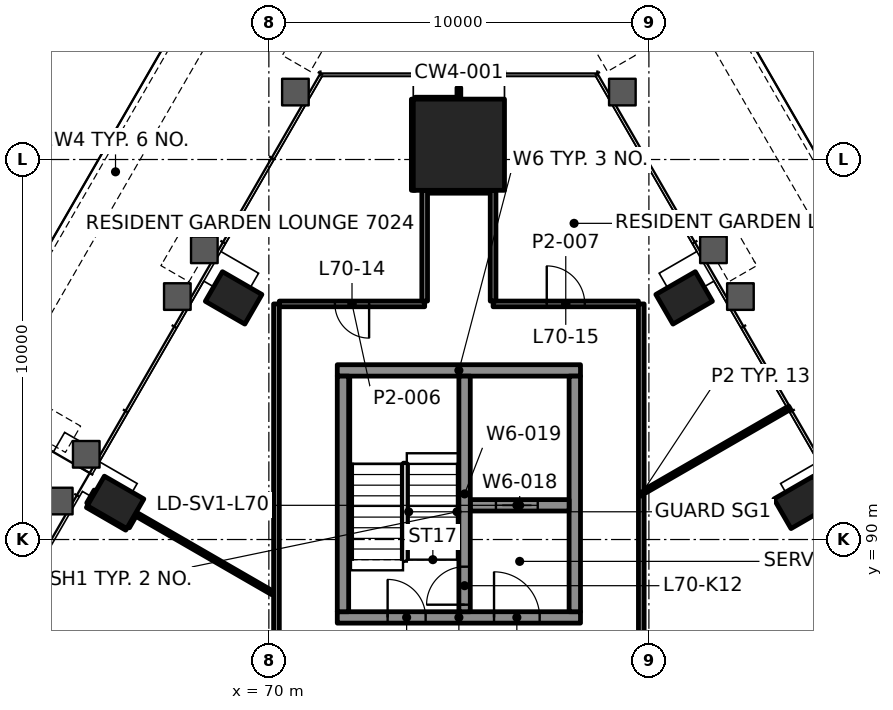
"""IFC4 building model, lengths in metres.
Left out: names, types, materials, properties, quantities, classifications, styles, units other than length and angle.
Written with IfcOpenShell. Run it as: python <this file> out.ifc"""

import sys

from ifc_helpers import new_model, si_unit, direction, frame, frame_2d, origin, origin_2d, place, context, subcontext, project, spatial, rectangle, hollow_rectangle, extrude, element, fill, save


model = new_model("IFC4")
c1 = context("Model", 3, precision=1e-05, world=origin(), true_north=direction((0.0, 1.0)))
c2 = subcontext(c1, "Body", "Model", "MODEL_VIEW")
j1 = project(units=[si_unit("LENGTHUNIT", "METRE"), si_unit("PLANEANGLEUNIT", "RADIAN")], contexts=[c1])
p1 = place(None, origin())
s1 = spatial("IfcSite", under=j1, at=p1, CompositionType="ELEMENT")
p2 = place(p1, origin())
s2 = spatial("IfcBuilding", under=s1, at=p2, CompositionType="ELEMENT")
p3 = place(p2, frame((0.0, 0.0, 291.6)))
s3 = spatial("IfcBuildingStorey", under=s2, at=p3, CompositionType="ELEMENT", Elevation=291.6)
p4 = place(p3, frame((75.0, 100.389, 0.0), z_axis=(0.0, 0.0, 1.0), x_axis=(-1.0, 0.0, 0.0)))
e1 = element("IfcColumn", 1, at=p4, inside=s3, PredefinedType="COLUMN", context=c2, shape_type="SweptSolid", body=[
    extrude(rectangle(XDim=2.4, YDim=2.4, at=origin_2d()), origin(), (0.0, 0.0, 1.0), 3.5),
])
for number, where, z_axis, x_axis in (
    (2, (84.034, 90.978, -0.0), (0.0, 0.0, 1.0), (-0.5, 0.866, 0.0)),
    (3, (80.927, 96.358, -0.0), (0.0, 0.0, 1.0), (-0.5, 0.866, 0.0)),
    (4, (69.073, 96.358, -0.0), (0.0, 0.0, 1.0), (-0.5, -0.866, 0.0)),
    (5, (65.966, 90.978, -0.0), (0.0, 0.0, 1.0), (-0.5, -0.866, 0.0)),
):
    element("IfcColumn", number, at=place(p3, frame(where, z_axis=z_axis, x_axis=x_axis)), inside=s3, PredefinedType="COLUMN", context=c2, shape_type="SweptSolid", body=[
        extrude(hollow_rectangle(XDim=0.9, YDim=1.2, WallThickness=0.06, at=origin_2d()), origin(), (0.0, 0.0, 1.0), 3.5),
    ])
p5 = place(p3, frame((71.8, 87.95, 0.0), z_axis=(0.0, 0.0, 1.0), x_axis=(1.0, 0.0, 0.0)))
e6 = element("IfcWall", 6, at=p5, inside=s3, PredefinedType="SHEAR", context=c2, shape_type="SweptSolid", body=[
    extrude(rectangle(XDim=6.4, YDim=0.3, at=frame_2d((3.2, 0.0))), origin(), (0.0, 0.0, 1.0), 3.3),
])
p6 = place(p5, frame((1.325, 0.0, 0.0)))
e7 = element("IfcOpeningElement", 7, at=p6, cuts=e6, PredefinedType="OPENING", context=c2, shape_type="SweptSolid", body=[
    extrude(rectangle(XDim=1.0, YDim=2.1, at=frame_2d((0.5, 1.05))), frame((0.0, 0.16, 0.0), z_axis=(0.0, -1.0, 0.0), x_axis=(1.0, 0.0, 0.0)), (0.0, 0.0, 1.0), 0.32),
])
p7 = place(p5, frame((4.125, 0.0, 0.0)))
e8 = element("IfcOpeningElement", 8, at=p7, cuts=e6, PredefinedType="OPENING", context=c2, shape_type="SweptSolid", body=[
    extrude(rectangle(XDim=1.2, YDim=2.1, at=frame_2d((0.6, 1.05))), frame((0.0, 0.16, 0.0), z_axis=(0.0, -1.0, 0.0), x_axis=(1.0, 0.0, 0.0)), (0.0, 0.0, 1.0), 0.32),
])
p8 = place(p3, frame((71.8, 94.45, 0.0), z_axis=(0.0, 0.0, 1.0), x_axis=(1.0, 0.0, 0.0)))
e9 = element("IfcWall", 9, at=p8, inside=s3, PredefinedType="SHEAR", context=c2, shape_type="SweptSolid", body=[
    extrude(rectangle(XDim=6.4, YDim=0.3, at=frame_2d((3.2, 0.0))), origin(), (0.0, 0.0, 1.0), 3.3),
])
for number, where, z_axis, x_axis in (
    (10, (71.95, 88.1, 0.0), (0.0, 0.0, 1.0), (0.0, 1.0, 0.0)),
    (11, (78.05, 88.1, 0.0), (0.0, 0.0, 1.0), (0.0, 1.0, 0.0)),
):
    element("IfcWall", number, at=place(p3, frame(where, z_axis=z_axis, x_axis=x_axis)), inside=s3, PredefinedType="SHEAR", context=c2, shape_type="SweptSolid", body=[
        extrude(rectangle(XDim=6.2, YDim=0.3, at=frame_2d((3.1, 0.0))), origin(), (0.0, 0.0, 1.0), 3.3),
    ])
p9 = place(p3, frame((75.3, 90.9, 0.0), z_axis=(0.0, 0.0, 1.0), x_axis=(1.0, 0.0, 0.0)))
e12 = element("IfcWall", 12, at=p9, inside=s3, PredefinedType="SHEAR", context=c2, shape_type="SweptSolid", body=[
    extrude(rectangle(XDim=2.6, YDim=0.3, at=frame_2d((1.3, 0.0))), origin(), (0.0, 0.0, 1.0), 3.3),
])
p10 = place(p9, frame((0.675, 0.0, 0.0)))
e13 = element("IfcOpeningElement", 13, at=p10, cuts=e12, PredefinedType="OPENING", context=c2, shape_type="SweptSolid", body=[
    extrude(rectangle(XDim=1.1, YDim=2.1, at=frame_2d((0.55, 1.05))), frame((0.0, 0.16, 0.0), z_axis=(0.0, -1.0, 0.0), x_axis=(1.0, 0.0, 0.0)), (0.0, 0.0, 1.0), 0.32),
])
p11 = place(p3, frame((75.15, 88.1, 0.0), z_axis=(0.0, 0.0, 1.0), x_axis=(0.0, 1.0, 0.0)))
e14 = element("IfcWall", 14, at=p11, inside=s3, PredefinedType="SHEAR", context=c2, shape_type="SweptSolid", body=[
    extrude(rectangle(XDim=6.2, YDim=0.3, at=frame_2d((3.1, 0.0))), origin(), (0.0, 0.0, 1.0), 3.3),
])
p12 = place(p11, frame((0.185, 0.0, 0.0)))
e15 = element("IfcOpeningElement", 15, at=p12, cuts=e14, PredefinedType="OPENING", context=c2, shape_type="SweptSolid", body=[
    extrude(rectangle(XDim=1.0, YDim=2.1, at=frame_2d((0.5, 1.05))), frame((0.0, 0.16, 0.0), z_axis=(0.0, -1.0, 0.0), x_axis=(1.0, 0.0, 0.0)), (0.0, 0.0, 1.0), 0.32),
])
p13 = place(p3, frame((74.1, 96.2, 0.0), z_axis=(0.0, 0.0, 1.0), x_axis=(-1.0, 0.0, 0.0)))
e16 = element("IfcWall", 16, at=p13, inside=s3, PredefinedType="PARTITIONING", context=c2, shape_type="SweptSolid", body=[
    extrude(rectangle(XDim=3.825, YDim=0.15, at=frame_2d((1.912, 0.0))), origin(), (0.0, 0.0, 1.0), 2.7),
])
p14 = place(p13, frame((1.462, 0.0, 0.0)))
e17 = element("IfcOpeningElement", 17, at=p14, cuts=e16, PredefinedType="OPENING", context=c2, shape_type="SweptSolid", body=[
    extrude(rectangle(XDim=0.9, YDim=2.1, at=frame_2d((0.45, 1.05))), frame((0.0, 0.085, 0.0), z_axis=(0.0, -1.0, 0.0), x_axis=(1.0, 0.0, 0.0)), (0.0, 0.0, 1.0), 0.17),
])
p15 = place(p3, frame((75.9, 96.2, 0.0), z_axis=(0.0, 0.0, 1.0), x_axis=(1.0, 0.0, 0.0)))
e18 = element("IfcWall", 18, at=p15, inside=s3, PredefinedType="PARTITIONING", context=c2, shape_type="SweptSolid", body=[
    extrude(rectangle(XDim=3.825, YDim=0.15, at=frame_2d((1.912, 0.0))), origin(), (0.0, 0.0, 1.0), 2.7),
])
p16 = place(p15, frame((1.412, 0.0, 0.0)))
e19 = element("IfcOpeningElement", 19, at=p16, cuts=e18, PredefinedType="OPENING", context=c2, shape_type="SweptSolid", body=[
    extrude(rectangle(XDim=1.0, YDim=2.1, at=frame_2d((0.5, 1.05))), frame((0.0, 0.085, 0.0), z_axis=(0.0, -1.0, 0.0), x_axis=(1.0, 0.0, 0.0)), (0.0, 0.0, 1.0), 0.17),
])
p17 = place(p3, frame((74.18, 99.189, 0.0), z_axis=(0.0, 0.0, 1.0), x_axis=(1.0, 0.0, 0.0)))
e20 = element("IfcWall", 20, at=p17, inside=s3, PredefinedType="PARTITIONING", context=c2, shape_type="SweptSolid", body=[
    extrude(rectangle(XDim=1.644, YDim=0.15, at=frame_2d((0.822, 0.0))), origin(), (0.0, 0.0, 1.0), 2.697),
])
p18 = place(p3, frame((73.851, 101.589, 0.0), z_axis=(0.0, 0.0, 1.0), x_axis=(1.0, 0.0, 0.0)))
e21 = element("IfcWall", 21, at=p18, inside=s3, PredefinedType="PARTITIONING", context=c2, shape_type="SweptSolid", body=[
    extrude(rectangle(XDim=1.149, YDim=0.1, at=frame_2d((0.575, 0.0))), origin(), (0.0, 0.0, 1.0), 2.7),
])
p19 = place(p3, frame((79.901, 91.274, 0.0), z_axis=(0.0, 0.0, 1.0), x_axis=(0.86602077629, 0.50000801497, 0.0)))
e22 = element("IfcWall", 22, at=p19, inside=s3, PredefinedType="PARTITIONING", context=c2, shape_type="SweptSolid", body=[
    extrude(rectangle(XDim=4.391, YDim=0.1, at=frame_2d((2.196, 0.0))), origin(), (0.0, 0.0, 1.0), 2.7),
])
p20 = place(p3, frame((66.288, 90.333, 0.0), z_axis=(0.0, 0.0, 1.0), x_axis=(0.499620918551, 0.866244155967, 0.0)))
e23 = element("IfcWall", 23, at=p20, inside=s3, PredefinedType="PARTITIONING", context=c2, shape_type="SweptSolid", body=[
    extrude(rectangle(XDim=0.347, YDim=0.1, at=frame_2d((0.173, 0.0))), origin(), (0.0, 0.0, 1.0), 2.7),
])
p21 = place(p3, frame((65.251, 90.938, 0.0), z_axis=(0.0, 0.0, 1.0), x_axis=(0.500225704022, 0.865895054285, 0.0)))
e24 = element("IfcWall", 24, at=p21, inside=s3, PredefinedType="PARTITIONING", context=c2, shape_type="SweptSolid", body=[
    extrude(rectangle(XDim=0.392, YDim=0.1, at=frame_2d((0.196, 0.0))), origin(), (0.0, 0.0, 1.0), 2.7),
])
p22 = place(p3, frame((79.8, 86.2, 0.0), z_axis=(0.0, 0.0, 1.0), x_axis=(0.0, 1.0, 0.0)))
e25 = element("IfcWall", 25, at=p22, inside=s3, PredefinedType="PARTITIONING", context=c2, shape_type="SweptSolid", body=[
    extrude(rectangle(XDim=9.999, YDim=0.15, at=frame_2d((5.0, 0.0))), origin(), (0.0, 0.0, 1.0), 2.7),
])
p23 = place(p3, frame((75.9, 96.275, 0.0), z_axis=(0.0, 0.0, 1.0), x_axis=(0.0, 1.0, 0.0)))
e26 = element("IfcWall", 26, at=p23, inside=s3, PredefinedType="PARTITIONING", context=c2, shape_type="SweptSolid", body=[
    extrude(rectangle(XDim=2.914, YDim=0.15, at=frame_2d((1.457, 0.0))), origin(), (0.0, 0.0, 1.0), 2.7),
])
p24 = place(p3, frame((75.0, 101.639, 0.0), z_axis=(0.0, 0.0, 1.0), x_axis=(0.0, 1.0, 0.0)))
e27 = element("IfcWall", 27, at=p24, inside=s3, PredefinedType="PARTITIONING", context=c2, shape_type="SweptSolid", body=[
    extrude(rectangle(XDim=0.25, YDim=0.1, at=frame_2d((0.125, 0.0))), origin(), (0.0, 0.0, 1.0), 2.7),
])
p25 = place(p3, frame((74.1, 96.275, 0.0), z_axis=(0.0, 0.0, 1.0), x_axis=(0.0, 1.0, 0.0)))
e28 = element("IfcWall", 28, at=p25, inside=s3, PredefinedType="PARTITIONING", context=c2, shape_type="SweptSolid", body=[
    extrude(rectangle(XDim=2.914, YDim=0.15, at=frame_2d((1.457, 0.0))), origin(), (0.0, 0.0, 1.0), 2.7),
])
p26 = place(p3, frame((73.8, 99.19, 0.0), z_axis=(0.0, 0.0, 1.0), x_axis=(0.0, 1.0, 0.0)))
e29 = element("IfcWall", 29, at=p26, inside=s3, PredefinedType="PARTITIONING", context=c2, shape_type="SweptSolid", body=[
    extrude(rectangle(XDim=2.399, YDim=0.1, at=frame_2d((1.199, 0.0))), origin(), (0.0, 0.0, 1.0), 2.7),
])
p27 = place(p3, frame((70.2, 86.202, 0.0), z_axis=(0.0, 0.0, 1.0), x_axis=(0.0, 1.0, 0.0)))
e30 = element("IfcWall", 30, at=p27, inside=s3, PredefinedType="PARTITIONING", context=c2, shape_type="SweptSolid", body=[
    extrude(rectangle(XDim=9.998, YDim=0.15, at=frame_2d((4.999, 0.0))), origin(), (0.0, 0.0, 1.0), 2.7),
])
p28 = place(p3, frame((70.099, 88.592, 0.0), z_axis=(0.0, 0.0, 1.0), x_axis=(-0.866045268016, 0.499965592563, 0.0)))
e31 = element("IfcWall", 31, at=p28, inside=s3, PredefinedType="PARTITIONING", context=c2, shape_type="SweptSolid", body=[
    extrude(rectangle(XDim=4.172, YDim=0.1, at=frame_2d((2.086, 0.0))), origin(), (0.0, 0.0, 1.0), 2.7),
])
p29 = place(p3, frame((66.258, 90.29, 0.0), z_axis=(0.0, 0.0, 1.0), x_axis=(-0.866032345022, 0.499987977232, 0.0)))
e32 = element("IfcWall", 32, at=p29, inside=s3, PredefinedType="PARTITIONING", context=c2, shape_type="SweptSolid", body=[
    extrude(rectangle(XDim=1.194, YDim=0.1, at=frame_2d((0.597, 0.0))), origin(), (0.0, 0.0, 1.0), 2.688),
])
p30 = place(p3, frame((104.039, 65.027, 0.0), z_axis=(0.0, 0.0, 1.0), x_axis=(-0.499997313161, 0.866026955026, 0.0)))
e33 = element("IfcWall", 33, at=p30, inside=s3, PredefinedType="SOLIDWALL", context=c2, shape_type="SweptSolid", body=[
    extrude(rectangle(XDim=46.312, YDim=0.8, at=frame_2d((23.156, 0.0))), origin(), (0.0, 0.0, 1.0), 0.9),
])
p31 = place(p3, frame((69.117, 105.135, 0.0), z_axis=(0.0, 0.0, 1.0), x_axis=(-0.500004627431, -0.86602273212, 0.0)))
e34 = element("IfcWall", 34, at=p31, inside=s3, PredefinedType="SOLIDWALL", context=c2, shape_type="SweptSolid", body=[
    extrude(rectangle(XDim=12.607, YDim=0.8, at=frame_2d((6.304, 0.0))), origin(), (0.0, 0.0, 1.0), 0.9),
])
p32 = place(p3, frame((62.941, 93.739, 0.0), z_axis=(0.0, 0.0, 1.0), x_axis=(0.866008176907, -0.50002983664, 0.0)))
e35 = element("IfcWall", 35, at=p32, inside=s3, PredefinedType="SOLIDWALL", context=c2, shape_type="SweptSolid", body=[
    extrude(rectangle(XDim=2.2, YDim=0.8, at=frame_2d((1.1, 0.0))), origin(), (0.0, 0.0, 1.0), 0.9),
])
p33 = place(p14, origin())
e36 = element("IfcDoor", 36, at=p33, inside=s3, OperationType="SINGLE_SWING_RIGHT", PredefinedType="DOOR", context=c2, shape_type="SweptSolid", body=[
    extrude(rectangle(XDim=0.9, YDim=2.1, at=frame_2d((0.45, 1.05))), frame((0.0, 0.025, 0.0), z_axis=(0.0, -1.0, 0.0), x_axis=(1.0, 0.0, 0.0)), (0.0, 0.0, 1.0), 0.05),
])
fill(e17, e36)
p34 = place(p16, origin())
e37 = element("IfcDoor", 37, at=p34, inside=s3, OperationType="SINGLE_SWING_RIGHT", PredefinedType="DOOR", context=c2, shape_type="SweptSolid", body=[
    extrude(rectangle(XDim=1.0, YDim=2.1, at=frame_2d((0.5, 1.05))), frame((0.0, 0.025, 0.0), z_axis=(0.0, -1.0, 0.0), x_axis=(1.0, 0.0, 0.0)), (0.0, 0.0, 1.0), 0.05),
])
fill(e19, e37)
p35 = place(p10, origin())
e38 = element("IfcDoor", 38, at=p35, inside=s3, OperationType="DOUBLE_DOOR_SLIDING", PredefinedType="DOOR", context=c2, shape_type="SweptSolid", body=[
    extrude(rectangle(XDim=1.1, YDim=2.1, at=frame_2d((0.55, 1.05))), frame((0.0, 0.025, 0.0), z_axis=(0.0, -1.0, 0.0), x_axis=(1.0, 0.0, 0.0)), (0.0, 0.0, 1.0), 0.05),
])
fill(e13, e38)
p36 = place(p6, origin())
e39 = element("IfcDoor", 39, at=p36, inside=s3, OperationType="SINGLE_SWING_RIGHT", PredefinedType="DOOR", context=c2, shape_type="SweptSolid", body=[
    extrude(rectangle(XDim=1.0, YDim=2.1, at=frame_2d((0.5, 1.05))), frame((0.0, 0.025, 0.0), z_axis=(0.0, -1.0, 0.0), x_axis=(1.0, 0.0, 0.0)), (0.0, 0.0, 1.0), 0.05),
])
fill(e7, e39)
p37 = place(p12, origin())
e40 = element("IfcDoor", 40, at=p37, inside=s3, OperationType="SINGLE_SWING_LEFT", PredefinedType="DOOR", context=c2, shape_type="SweptSolid", body=[
    extrude(rectangle(XDim=1.0, YDim=2.1, at=frame_2d((0.5, 1.05))), frame((0.0, 0.025, 0.0), z_axis=(0.0, -1.0, 0.0), x_axis=(1.0, 0.0, 0.0)), (0.0, 0.0, 1.0), 0.05),
])
fill(e15, e40)
p38 = place(p7, origin())
e41 = element("IfcDoor", 41, at=p38, inside=s3, OperationType="SINGLE_SWING_RIGHT", PredefinedType="DOOR", context=c2, shape_type="SweptSolid", body=[
    extrude(rectangle(XDim=1.2, YDim=2.1, at=frame_2d((0.6, 1.05))), frame((0.0, 0.025, 0.0), z_axis=(0.0, -1.0, 0.0), x_axis=(1.0, 0.0, 0.0)), (0.0, 0.0, 1.0), 0.05),
])
fill(e8, e41)
save(model, sys.argv[1])
